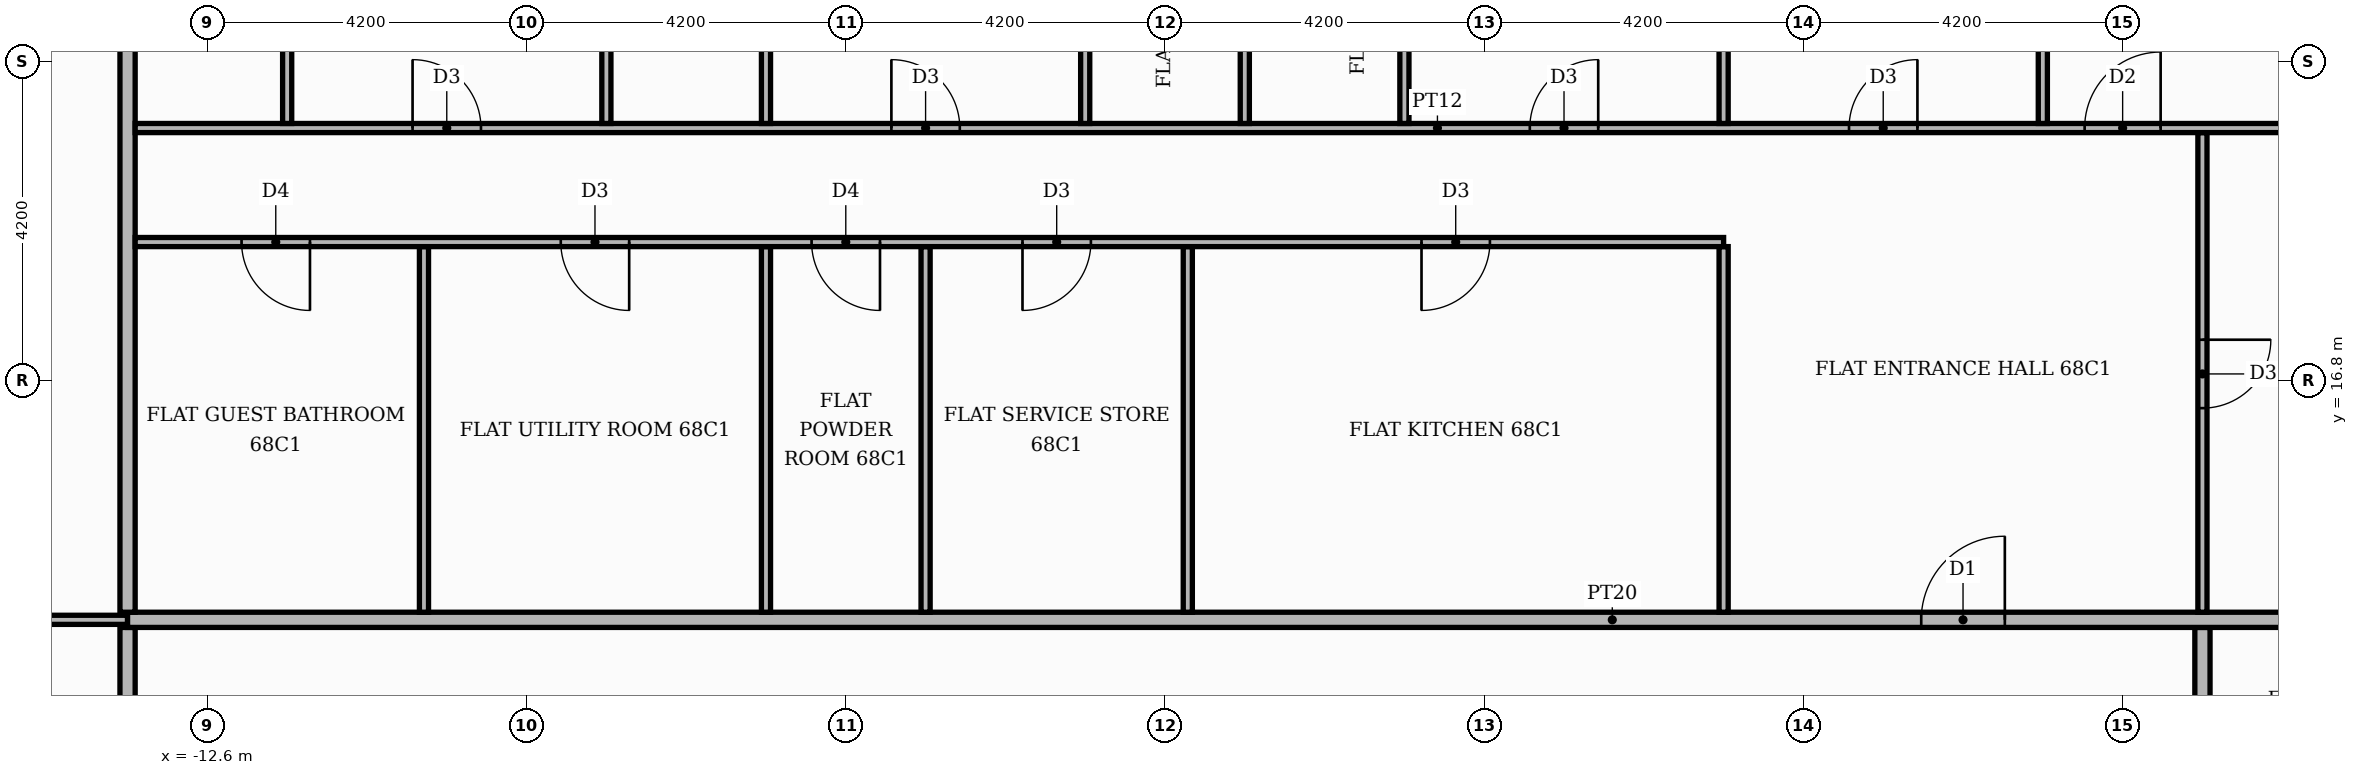
"""IFC4 building model, lengths in metres.
Left out: names, types, materials, properties, quantities, classifications, styles, units other than length and angle.
Written with IfcOpenShell. Run it as: python <this file> out.ifc"""

import sys

from ifc_helpers import new_model, si_unit, direction, frame, frame_2d, origin, place, context, subcontext, project, spatial, rectangle, extrude, element, fill, save


model = new_model("IFC4")
c1 = context("Model", 3, precision=1e-05, world=origin(), true_north=direction((0.0, 1.0)))
c2 = subcontext(c1, "Body", "Model", "MODEL_VIEW")
j1 = project(units=[si_unit("LENGTHUNIT", "METRE"), si_unit("PLANEANGLEUNIT", "RADIAN")], contexts=[c1])
p1 = place(None, origin())
s1 = spatial("IfcSite", under=j1, at=p1, CompositionType="ELEMENT")
p2 = place(p1, origin())
s2 = spatial("IfcBuilding", under=s1, at=p2, CompositionType="ELEMENT")
p3 = place(p2, frame((0.0, 0.0, 283.5)))
s3 = spatial("IfcBuildingStorey", under=s2, at=p3, CompositionType="ELEMENT", Elevation=283.5)
for number, where, z_axis, x_axis in (
    (1, (-13.65, 11.1, 0.0), (0.0, 0.0, 1.0), (0.0, 1.0, 0.0)),
    (2, (13.65, 11.1, 0.0), (0.0, 0.0, 1.0), (0.0, 1.0, 0.0)),
):
    element("IfcWall", number, at=place(p3, frame(where, z_axis=z_axis, x_axis=x_axis)), inside=s3, PredefinedType="PARTITIONING", context=c2, shape_type="SweptSolid", body=[
        extrude(rectangle(XDim=2.45, YDim=0.2, at=frame_2d((1.225, 0.0))), origin(), (0.0, 0.0, 1.0), 3.4),
    ])
p4 = place(p3, frame((-19.82, 13.65, 0.0), z_axis=(0.0, 0.0, 1.0), x_axis=(1.0, 0.0, 0.0)))
e3 = element("IfcWall", 3, at=p4, inside=s3, PredefinedType="PARTITIONING", context=c2, shape_type="SweptSolid", body=[
    extrude(rectangle(XDim=6.17, YDim=0.12, at=frame_2d((3.085, 0.0))), origin(), (0.0, 0.0, 1.0), 3.4),
])
p5 = place(p4, frame((2.635, 0.0, 0.0)))
e4 = element("IfcOpeningElement", 4, at=p5, cuts=e3, PredefinedType="OPENING", context=c2, shape_type="SweptSolid", body=[
    extrude(rectangle(XDim=0.9, YDim=2.1, at=frame_2d((0.45, 1.05))), frame((0.0, 0.07, 0.0), z_axis=(0.0, -1.0, 0.0), x_axis=(1.0, 0.0, 0.0)), (0.0, 0.0, 1.0), 0.14),
])
p6 = place(p3, frame((-13.65, 13.65, 0.0), z_axis=(0.0, 0.0, 1.0), x_axis=(1.0, 0.0, 0.0)))
e5 = element("IfcWall", 5, at=p6, inside=s3, PredefinedType="PARTITIONING", context=c2, shape_type="SweptSolid", body=[
    extrude(rectangle(XDim=39.07, YDim=0.2, at=frame_2d((19.535, 0.0))), origin(), (0.0, 0.0, 1.0), 3.4),
])
p7 = place(p6, frame((23.6, 0.0, 0.0)))
e6 = element("IfcOpeningElement", 6, at=p7, cuts=e5, PredefinedType="OPENING", context=c2, shape_type="SweptSolid", body=[
    extrude(rectangle(XDim=1.1, YDim=2.4, at=frame_2d((0.55, 1.2))), frame((0.0, 0.11, 0.0), z_axis=(0.0, -1.0, 0.0), x_axis=(1.0, 0.0, 0.0)), (0.0, 0.0, 1.0), 0.22),
])
p8 = place(p3, frame((-13.65, 13.75, 0.0), z_axis=(0.0, 0.0, 1.0), x_axis=(0.0, 1.0, 0.0)))
e7 = element("IfcWall", 7, at=p8, inside=s3, PredefinedType="PARTITIONING", context=c2, shape_type="SweptSolid", body=[
    extrude(rectangle(XDim=11.67, YDim=0.2, at=frame_2d((5.835, 0.0))), origin(), (0.0, 0.0, 1.0), 3.4),
])
for number, where, z_axis, x_axis in (
    (8, (-9.75, 13.75, 0.0), (0.0, 0.0, 1.0), (0.0, 1.0, 0.0)),
    (9, (-5.25, 13.75, 0.0), (0.0, 0.0, 1.0), (0.0, 1.0, 0.0)),
    (10, (-3.15, 13.75, 0.0), (0.0, 0.0, 1.0), (0.0, 1.0, 0.0)),
    (11, (0.3, 13.75, 0.0), (0.0, 0.0, 1.0), (0.0, 1.0, 0.0)),
    (12, (7.35, 13.75, 0.0), (0.0, 0.0, 1.0), (0.0, 1.0, 0.0)),
):
    element("IfcWall", number, at=place(p3, frame(where, z_axis=z_axis, x_axis=x_axis)), inside=s3, PredefinedType="PARTITIONING", context=c2, shape_type="SweptSolid", body=[
        extrude(rectangle(XDim=4.81, YDim=0.12, at=frame_2d((2.405, 0.0))), origin(), (0.0, 0.0, 1.0), 3.4),
    ])
p9 = place(p3, frame((13.65, 13.75, 0.0), z_axis=(0.0, 0.0, 1.0), x_axis=(0.0, 1.0, 0.0)))
e13 = element("IfcWall", 13, at=p9, inside=s3, PredefinedType="PARTITIONING", context=c2, shape_type="SweptSolid", body=[
    extrude(rectangle(XDim=6.31, YDim=0.12, at=frame_2d((3.155, 0.0))), origin(), (0.0, 0.0, 1.0), 3.4),
])
p10 = place(p9, frame((2.685, 0.0, 0.0)))
e14 = element("IfcOpeningElement", 14, at=p10, cuts=e13, PredefinedType="OPENING", context=c2, shape_type="SweptSolid", body=[
    extrude(rectangle(XDim=0.9, YDim=2.1, at=frame_2d((0.45, 1.05))), frame((0.0, 0.07, 0.0), z_axis=(0.0, -1.0, 0.0), x_axis=(1.0, 0.0, 0.0)), (0.0, 0.0, 1.0), 0.14),
])
p11 = place(p3, frame((-13.55, 18.62, 0.0), z_axis=(0.0, 0.0, 1.0), x_axis=(1.0, 0.0, 0.0)))
e15 = element("IfcWall", 15, at=p11, inside=s3, PredefinedType="PARTITIONING", context=c2, shape_type="SweptSolid", body=[
    extrude(rectangle(XDim=20.9, YDim=0.12, at=frame_2d((10.45, 0.0))), origin(), (0.0, 0.0, 1.0), 3.4),
])
p12 = place(p11, frame((16.925, 0.0, 0.0)))
e16 = element("IfcOpeningElement", 16, at=p12, cuts=e15, PredefinedType="OPENING", context=c2, shape_type="SweptSolid", body=[
    extrude(rectangle(XDim=0.9, YDim=2.1, at=frame_2d((0.45, 1.05))), frame((0.0, 0.07, 0.0), z_axis=(0.0, -1.0, 0.0), x_axis=(1.0, 0.0, 0.0)), (0.0, 0.0, 1.0), 0.14),
])
p13 = place(p11, frame((11.675, 0.0, 0.0)))
e17 = element("IfcOpeningElement", 17, at=p13, cuts=e15, PredefinedType="OPENING", context=c2, shape_type="SweptSolid", body=[
    extrude(rectangle(XDim=0.9, YDim=2.1, at=frame_2d((0.45, 1.05))), frame((0.0, 0.07, 0.0), z_axis=(0.0, -1.0, 0.0), x_axis=(1.0, 0.0, 0.0)), (0.0, 0.0, 1.0), 0.14),
])
p14 = place(p11, frame((8.9, 0.0, 0.0)))
e18 = element("IfcOpeningElement", 18, at=p14, cuts=e15, PredefinedType="OPENING", context=c2, shape_type="SweptSolid", body=[
    extrude(rectangle(XDim=0.9, YDim=2.1, at=frame_2d((0.45, 1.05))), frame((0.0, 0.07, 0.0), z_axis=(0.0, -1.0, 0.0), x_axis=(1.0, 0.0, 0.0)), (0.0, 0.0, 1.0), 0.14),
])
p15 = place(p11, frame((5.6, 0.0, 0.0)))
e19 = element("IfcOpeningElement", 19, at=p15, cuts=e15, PredefinedType="OPENING", context=c2, shape_type="SweptSolid", body=[
    extrude(rectangle(XDim=0.9, YDim=2.1, at=frame_2d((0.45, 1.05))), frame((0.0, 0.07, 0.0), z_axis=(0.0, -1.0, 0.0), x_axis=(1.0, 0.0, 0.0)), (0.0, 0.0, 1.0), 0.14),
])
p16 = place(p11, frame((1.4, 0.0, 0.0)))
e20 = element("IfcOpeningElement", 20, at=p16, cuts=e15, PredefinedType="OPENING", context=c2, shape_type="SweptSolid", body=[
    extrude(rectangle(XDim=0.9, YDim=2.1, at=frame_2d((0.45, 1.05))), frame((0.0, 0.07, 0.0), z_axis=(0.0, -1.0, 0.0), x_axis=(1.0, 0.0, 0.0)), (0.0, 0.0, 1.0), 0.14),
])
p17 = place(p3, frame((-13.55, 20.12, 0.0), z_axis=(0.0, 0.0, 1.0), x_axis=(1.0, 0.0, 0.0)))
e21 = element("IfcWall", 21, at=p17, inside=s3, PredefinedType="PARTITIONING", context=c2, shape_type="SweptSolid", body=[
    extrude(rectangle(XDim=34.269, YDim=0.12, at=frame_2d((17.135, 0.0))), origin(), (0.0, 0.0, 1.0), 3.4),
])
p18 = place(p17, frame((25.65, 0.0, 0.0)))
e22 = element("IfcOpeningElement", 22, at=p18, cuts=e21, PredefinedType="OPENING", context=c2, shape_type="SweptSolid", body=[
    extrude(rectangle(XDim=1.0, YDim=2.1, at=frame_2d((0.5, 1.05))), frame((0.0, 0.07, 0.0), z_axis=(0.0, -1.0, 0.0), x_axis=(1.0, 0.0, 0.0)), (0.0, 0.0, 1.0), 0.14),
])
p19 = place(p17, frame((22.55, 0.0, 0.0)))
e23 = element("IfcOpeningElement", 23, at=p19, cuts=e21, PredefinedType="OPENING", context=c2, shape_type="SweptSolid", body=[
    extrude(rectangle(XDim=0.9, YDim=2.1, at=frame_2d((0.45, 1.05))), frame((0.0, 0.07, 0.0), z_axis=(0.0, -1.0, 0.0), x_axis=(1.0, 0.0, 0.0)), (0.0, 0.0, 1.0), 0.14),
])
p20 = place(p17, frame((18.35, 0.0, 0.0)))
e24 = element("IfcOpeningElement", 24, at=p20, cuts=e21, PredefinedType="OPENING", context=c2, shape_type="SweptSolid", body=[
    extrude(rectangle(XDim=0.9, YDim=2.1, at=frame_2d((0.45, 1.05))), frame((0.0, 0.07, 0.0), z_axis=(0.0, -1.0, 0.0), x_axis=(1.0, 0.0, 0.0)), (0.0, 0.0, 1.0), 0.14),
])
p21 = place(p17, frame((9.95, 0.0, 0.0)))
e25 = element("IfcOpeningElement", 25, at=p21, cuts=e21, PredefinedType="OPENING", context=c2, shape_type="SweptSolid", body=[
    extrude(rectangle(XDim=0.9, YDim=2.1, at=frame_2d((0.45, 1.05))), frame((0.0, 0.07, 0.0), z_axis=(0.0, -1.0, 0.0), x_axis=(1.0, 0.0, 0.0)), (0.0, 0.0, 1.0), 0.14),
])
p22 = place(p17, frame((3.65, 0.0, 0.0)))
e26 = element("IfcOpeningElement", 26, at=p22, cuts=e21, PredefinedType="OPENING", context=c2, shape_type="SweptSolid", body=[
    extrude(rectangle(XDim=0.9, YDim=2.1, at=frame_2d((0.45, 1.05))), frame((0.0, 0.07, 0.0), z_axis=(0.0, -1.0, 0.0), x_axis=(1.0, 0.0, 0.0)), (0.0, 0.0, 1.0), 0.14),
])
p23 = place(p3, frame((-11.55, 20.18, 0.0), z_axis=(0.0, 0.0, 1.0), x_axis=(0.0, 1.0, 0.0)))
e27 = element("IfcWall", 27, at=p23, inside=s3, PredefinedType="PARTITIONING", context=c2, shape_type="SweptSolid", body=[
    extrude(rectangle(XDim=5.24, YDim=0.12, at=frame_2d((2.62, 0.0))), origin(), (0.0, 0.0, 1.0), 3.4),
])
p24 = place(p23, frame((2.29, 0.0, 0.0)))
e28 = element("IfcOpeningElement", 28, at=p24, cuts=e27, PredefinedType="OPENING", context=c2, shape_type="SweptSolid", body=[
    extrude(rectangle(XDim=0.9, YDim=2.1, at=frame_2d((0.45, 1.05))), frame((0.0, 0.07, 0.0), z_axis=(0.0, -1.0, 0.0), x_axis=(1.0, 0.0, 0.0)), (0.0, 0.0, 1.0), 0.14),
])
p25 = place(p3, frame((-7.35, 20.18, 0.0), z_axis=(0.0, 0.0, 1.0), x_axis=(0.0, 1.0, 0.0)))
e29 = element("IfcWall", 29, at=p25, inside=s3, PredefinedType="PARTITIONING", context=c2, shape_type="SweptSolid", body=[
    extrude(rectangle(XDim=5.24, YDim=0.12, at=frame_2d((2.62, 0.0))), origin(), (0.0, 0.0, 1.0), 3.4),
])
p26 = place(p3, frame((-5.25, 20.18, 0.0), z_axis=(0.0, 0.0, 1.0), x_axis=(0.0, 1.0, 0.0)))
e30 = element("IfcWall", 30, at=p26, inside=s3, PredefinedType="PARTITIONING", context=c2, shape_type="SweptSolid", body=[
    extrude(rectangle(XDim=5.24, YDim=0.12, at=frame_2d((2.62, 0.0))), origin(), (0.0, 0.0, 1.0), 3.4),
])
p27 = place(p26, frame((2.29, 0.0, 0.0)))
e31 = element("IfcOpeningElement", 31, at=p27, cuts=e30, PredefinedType="OPENING", context=c2, shape_type="SweptSolid", body=[
    extrude(rectangle(XDim=0.9, YDim=2.1, at=frame_2d((0.45, 1.05))), frame((0.0, 0.07, 0.0), z_axis=(0.0, -1.0, 0.0), x_axis=(1.0, 0.0, 0.0)), (0.0, 0.0, 1.0), 0.14),
])
p28 = place(p3, frame((-1.05, 20.18, 0.0), z_axis=(0.0, 0.0, 1.0), x_axis=(0.0, 1.0, 0.0)))
e32 = element("IfcWall", 32, at=p28, inside=s3, PredefinedType="PARTITIONING", context=c2, shape_type="SweptSolid", body=[
    extrude(rectangle(XDim=5.24, YDim=0.12, at=frame_2d((2.62, 0.0))), origin(), (0.0, 0.0, 1.0), 3.4),
])
p29 = place(p3, frame((1.05, 20.18, 0.0), z_axis=(0.0, 0.0, 1.0), x_axis=(0.0, 1.0, 0.0)))
e33 = element("IfcWall", 33, at=p29, inside=s3, PredefinedType="PARTITIONING", context=c2, shape_type="SweptSolid", body=[
    extrude(rectangle(XDim=5.24, YDim=0.12, at=frame_2d((2.62, 0.0))), origin(), (0.0, 0.0, 1.0), 3.4),
])
p30 = place(p29, frame((2.29, 0.0, 0.0)))
e34 = element("IfcOpeningElement", 34, at=p30, cuts=e33, PredefinedType="OPENING", context=c2, shape_type="SweptSolid", body=[
    extrude(rectangle(XDim=0.9, YDim=2.1, at=frame_2d((0.45, 1.05))), frame((0.0, 0.07, 0.0), z_axis=(0.0, -1.0, 0.0), x_axis=(1.0, 0.0, 0.0)), (0.0, 0.0, 1.0), 0.14),
])
p31 = place(p3, frame((3.15, 20.18, 0.0), z_axis=(0.0, 0.0, 1.0), x_axis=(0.0, 1.0, 0.0)))
e35 = element("IfcWall", 35, at=p31, inside=s3, PredefinedType="PARTITIONING", context=c2, shape_type="SweptSolid", body=[
    extrude(rectangle(XDim=5.24, YDim=0.12, at=frame_2d((2.62, 0.0))), origin(), (0.0, 0.0, 1.0), 3.4),
])
p32 = place(p31, frame((2.29, 0.0, 0.0)))
e36 = element("IfcOpeningElement", 36, at=p32, cuts=e35, PredefinedType="OPENING", context=c2, shape_type="SweptSolid", body=[
    extrude(rectangle(XDim=0.9, YDim=2.1, at=frame_2d((0.45, 1.05))), frame((0.0, 0.07, 0.0), z_axis=(0.0, -1.0, 0.0), x_axis=(1.0, 0.0, 0.0)), (0.0, 0.0, 1.0), 0.14),
])
for number, where, z_axis, x_axis in (
    (37, (7.35, 20.18, 0.0), (0.0, 0.0, 1.0), (0.0, 1.0, 0.0)),
    (38, (11.55, 20.18, 0.0), (0.0, 0.0, 1.0), (0.0, 1.0, 0.0)),
):
    element("IfcWall", number, at=place(p3, frame(where, z_axis=z_axis, x_axis=x_axis)), inside=s3, PredefinedType="PARTITIONING", context=c2, shape_type="SweptSolid", body=[
        extrude(rectangle(XDim=5.24, YDim=0.12, at=frame_2d((2.62, 0.0))), origin(), (0.0, 0.0, 1.0), 3.4),
    ])
p33 = place(p7, origin())
e39 = element("IfcDoor", 39, at=p33, inside=s3, OperationType="SINGLE_SWING_RIGHT", PredefinedType="DOOR", context=c2, shape_type="SweptSolid", body=[
    extrude(rectangle(XDim=1.1, YDim=2.4, at=frame_2d((0.55, 1.2))), frame((0.0, 0.025, 0.0), z_axis=(0.0, -1.0, 0.0), x_axis=(1.0, 0.0, 0.0)), (0.0, 0.0, 1.0), 0.05),
])
fill(e6, e39)
p34 = place(p10, frame((0.9, 0.0, 0.0), z_axis=(0.0, 0.0, 1.0), x_axis=(-1.0, 0.0, 0.0)))
e40 = element("IfcDoor", 40, at=p34, inside=s3, OperationType="SINGLE_SWING_RIGHT", PredefinedType="DOOR", context=c2, shape_type="SweptSolid", body=[
    extrude(rectangle(XDim=0.9, YDim=2.1, at=frame_2d((0.45, 1.05))), frame((0.0, 0.025, 0.0), z_axis=(0.0, -1.0, 0.0), x_axis=(1.0, 0.0, 0.0)), (0.0, 0.0, 1.0), 0.05),
])
fill(e14, e40)
p35 = place(p12, frame((0.9, 0.0, 0.0), z_axis=(0.0, 0.0, 1.0), x_axis=(-1.0, 0.0, 0.0)))
e41 = element("IfcDoor", 41, at=p35, inside=s3, OperationType="SINGLE_SWING_LEFT", PredefinedType="DOOR", context=c2, shape_type="SweptSolid", body=[
    extrude(rectangle(XDim=0.9, YDim=2.1, at=frame_2d((0.45, 1.05))), frame((0.0, 0.025, 0.0), z_axis=(0.0, -1.0, 0.0), x_axis=(1.0, 0.0, 0.0)), (0.0, 0.0, 1.0), 0.05),
])
fill(e16, e41)
p36 = place(p13, frame((0.9, 0.0, 0.0), z_axis=(0.0, 0.0, 1.0), x_axis=(-1.0, 0.0, 0.0)))
e42 = element("IfcDoor", 42, at=p36, inside=s3, OperationType="SINGLE_SWING_LEFT", PredefinedType="DOOR", context=c2, shape_type="SweptSolid", body=[
    extrude(rectangle(XDim=0.9, YDim=2.1, at=frame_2d((0.45, 1.05))), frame((0.0, 0.025, 0.0), z_axis=(0.0, -1.0, 0.0), x_axis=(1.0, 0.0, 0.0)), (0.0, 0.0, 1.0), 0.05),
])
fill(e17, e42)
p37 = place(p14, frame((0.9, 0.0, 0.0), z_axis=(0.0, 0.0, 1.0), x_axis=(-1.0, 0.0, 0.0)))
e43 = element("IfcDoor", 43, at=p37, inside=s3, OperationType="SINGLE_SWING_RIGHT", PredefinedType="DOOR", context=c2, shape_type="SweptSolid", body=[
    extrude(rectangle(XDim=0.9, YDim=2.1, at=frame_2d((0.45, 1.05))), frame((0.0, 0.025, 0.0), z_axis=(0.0, -1.0, 0.0), x_axis=(1.0, 0.0, 0.0)), (0.0, 0.0, 1.0), 0.05),
])
fill(e18, e43)
p38 = place(p15, frame((0.9, 0.0, 0.0), z_axis=(0.0, 0.0, 1.0), x_axis=(-1.0, 0.0, 0.0)))
e44 = element("IfcDoor", 44, at=p38, inside=s3, OperationType="SINGLE_SWING_RIGHT", PredefinedType="DOOR", context=c2, shape_type="SweptSolid", body=[
    extrude(rectangle(XDim=0.9, YDim=2.1, at=frame_2d((0.45, 1.05))), frame((0.0, 0.025, 0.0), z_axis=(0.0, -1.0, 0.0), x_axis=(1.0, 0.0, 0.0)), (0.0, 0.0, 1.0), 0.05),
])
fill(e19, e44)
p39 = place(p16, frame((0.9, 0.0, 0.0), z_axis=(0.0, 0.0, 1.0), x_axis=(-1.0, 0.0, 0.0)))
e45 = element("IfcDoor", 45, at=p39, inside=s3, OperationType="SINGLE_SWING_RIGHT", PredefinedType="DOOR", context=c2, shape_type="SweptSolid", body=[
    extrude(rectangle(XDim=0.9, YDim=2.1, at=frame_2d((0.45, 1.05))), frame((0.0, 0.025, 0.0), z_axis=(0.0, -1.0, 0.0), x_axis=(1.0, 0.0, 0.0)), (0.0, 0.0, 1.0), 0.05),
])
fill(e20, e45)
p40 = place(p18, origin())
e46 = element("IfcDoor", 46, at=p40, inside=s3, OperationType="SINGLE_SWING_RIGHT", PredefinedType="DOOR", context=c2, shape_type="SweptSolid", body=[
    extrude(rectangle(XDim=1.0, YDim=2.1, at=frame_2d((0.5, 1.05))), frame((0.0, 0.025, 0.0), z_axis=(0.0, -1.0, 0.0), x_axis=(1.0, 0.0, 0.0)), (0.0, 0.0, 1.0), 0.05),
])
fill(e22, e46)
p41 = place(p19, origin())
e47 = element("IfcDoor", 47, at=p41, inside=s3, OperationType="SINGLE_SWING_RIGHT", PredefinedType="DOOR", context=c2, shape_type="SweptSolid", body=[
    extrude(rectangle(XDim=0.9, YDim=2.1, at=frame_2d((0.45, 1.05))), frame((0.0, 0.025, 0.0), z_axis=(0.0, -1.0, 0.0), x_axis=(1.0, 0.0, 0.0)), (0.0, 0.0, 1.0), 0.05),
])
fill(e23, e47)
p42 = place(p20, origin())
e48 = element("IfcDoor", 48, at=p42, inside=s3, OperationType="SINGLE_SWING_RIGHT", PredefinedType="DOOR", context=c2, shape_type="SweptSolid", body=[
    extrude(rectangle(XDim=0.9, YDim=2.1, at=frame_2d((0.45, 1.05))), frame((0.0, 0.025, 0.0), z_axis=(0.0, -1.0, 0.0), x_axis=(1.0, 0.0, 0.0)), (0.0, 0.0, 1.0), 0.05),
])
fill(e24, e48)
p43 = place(p21, origin())
e49 = element("IfcDoor", 49, at=p43, inside=s3, OperationType="SINGLE_SWING_LEFT", PredefinedType="DOOR", context=c2, shape_type="SweptSolid", body=[
    extrude(rectangle(XDim=0.9, YDim=2.1, at=frame_2d((0.45, 1.05))), frame((0.0, 0.025, 0.0), z_axis=(0.0, -1.0, 0.0), x_axis=(1.0, 0.0, 0.0)), (0.0, 0.0, 1.0), 0.05),
])
fill(e25, e49)
p44 = place(p22, origin())
e50 = element("IfcDoor", 50, at=p44, inside=s3, OperationType="SINGLE_SWING_LEFT", PredefinedType="DOOR", context=c2, shape_type="SweptSolid", body=[
    extrude(rectangle(XDim=0.9, YDim=2.1, at=frame_2d((0.45, 1.05))), frame((0.0, 0.025, 0.0), z_axis=(0.0, -1.0, 0.0), x_axis=(1.0, 0.0, 0.0)), (0.0, 0.0, 1.0), 0.05),
])
fill(e26, e50)
save(model, sys.argv[1])
